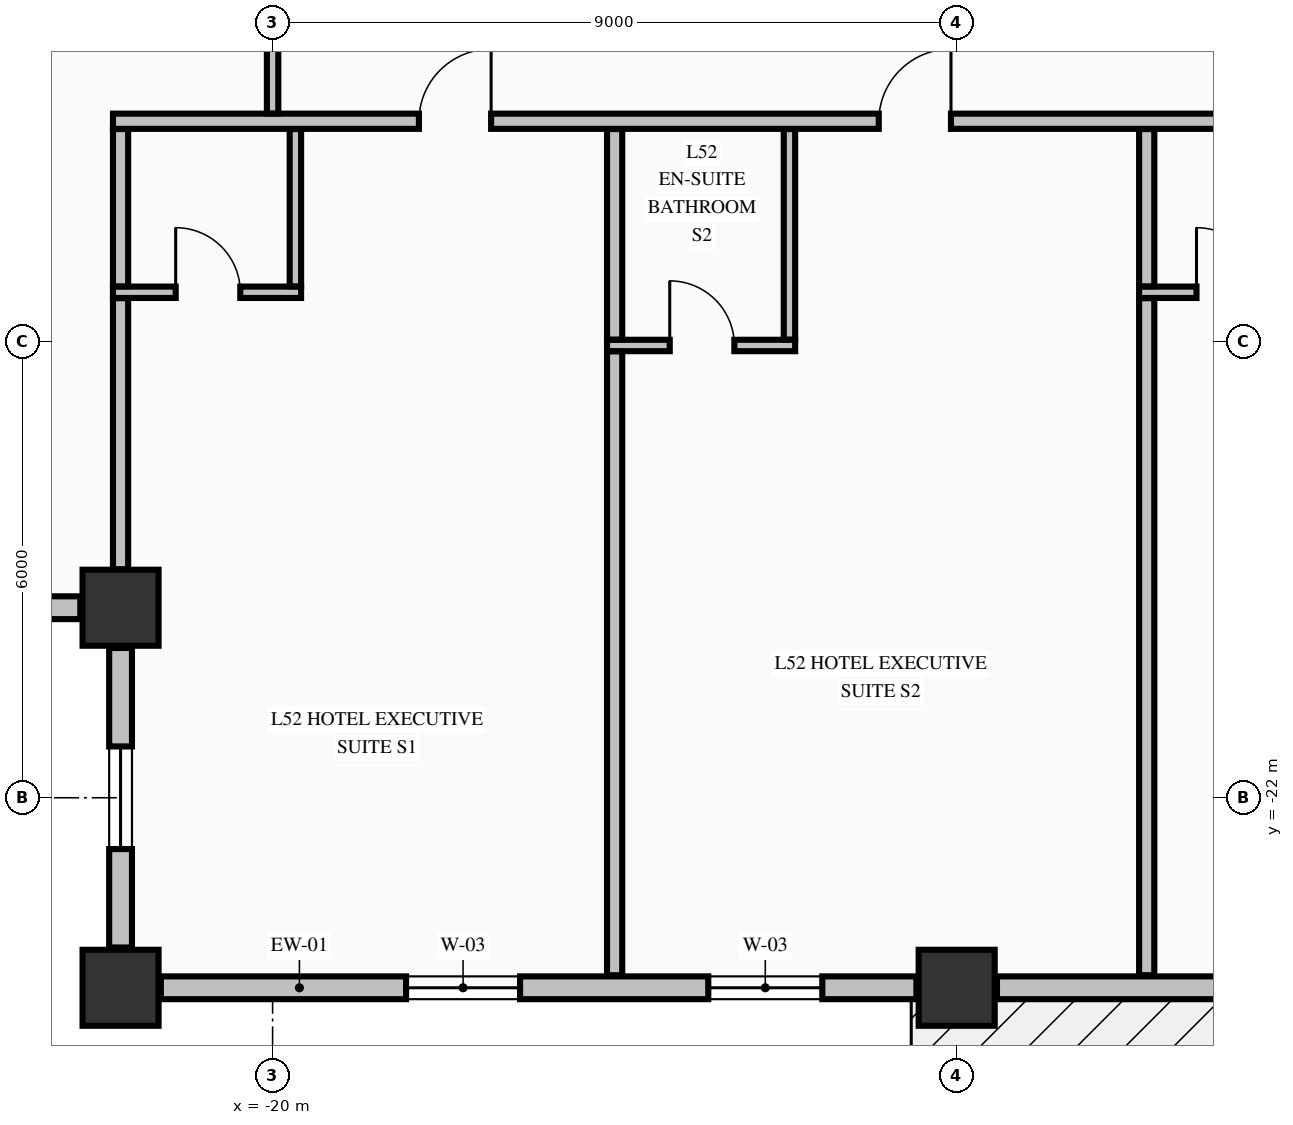
"""IFC4 building model, lengths in metres.
Left out: names, types, materials, properties, quantities, classifications, styles, units other than length and angle.
Written with IfcOpenShell. Run it as: python <this file> out.ifc"""

import sys

from ifc_helpers import new_model, si_unit, direction, frame, frame_2d, origin, origin_2d, place, context, subcontext, project, spatial, rectangle, extrude, element, fill, save


model = new_model("IFC4")
c1 = context("Model", 3, precision=1e-05, world=origin(), true_north=direction((0.0, 1.0)))
c2 = subcontext(c1, "Body", "Model", "MODEL_VIEW")
j1 = project(units=[si_unit("LENGTHUNIT", "METRE"), si_unit("PLANEANGLEUNIT", "RADIAN")], contexts=[c1])
p1 = place(None, origin())
s1 = spatial("IfcSite", under=j1, at=p1, CompositionType="ELEMENT")
p2 = place(p1, origin())
s2 = spatial("IfcBuilding", under=s1, at=p2, CompositionType="ELEMENT")
p3 = place(p2, frame((0.0, 0.0, 201.66)))
s3 = spatial("IfcBuildingStorey", under=s2, at=p3, CompositionType="ELEMENT", Elevation=201.66)
for number, where, z_axis, x_axis in (
    (1, (-22.0, -24.5, -0.25), (0.0, 0.0, 1.0), (1.0, 0.0, 0.0)),
    (2, (-11.0, -24.5, -0.25), (0.0, 0.0, 1.0), (1.0, 0.0, 0.0)),
    (3, (-22.0, -19.5, -0.25), (0.0, 0.0, 1.0), (1.0, 0.0, 0.0)),
):
    element("IfcColumn", number, at=place(p3, frame(where, z_axis=z_axis, x_axis=x_axis)), inside=s3, PredefinedType="COLUMN", context=c2, shape_type="SweptSolid", body=[
        extrude(rectangle(XDim=1.0, YDim=1.0, at=origin_2d()), origin(), (0.0, 0.0, 1.0), 3.4),
    ])
p4 = place(p3, frame((-26.47, -19.5, 0.0), z_axis=(0.0, 0.0, 1.0), x_axis=(1.0, 0.0, 0.0)))
e4 = element("IfcWall", 4, at=p4, inside=s3, PredefinedType="STANDARD", context=c2, shape_type="SweptSolid", body=[
    extrude(rectangle(XDim=3.94, YDim=0.3, at=frame_2d((1.97, 0.0))), origin(), (0.0, 0.0, 1.0), 2.542),
])
p5 = place(p4, frame((1.295, 0.0, 0.68)))
e5 = element("IfcOpeningElement", 5, at=p5, cuts=e4, PredefinedType="OPENING", context=c2, shape_type="SweptSolid", body=[
    extrude(rectangle(XDim=1.35, YDim=1.42, at=frame_2d((0.675, 0.71))), frame((0.0, 0.16, 0.0), z_axis=(0.0, -1.0, 0.0), x_axis=(1.0, 0.0, 0.0)), (0.0, 0.0, 1.0), 0.32),
])
p6 = place(p3, frame((-22.0, -20.03, 0.0), z_axis=(0.0, 0.0, 1.0), x_axis=(0.0, -1.0, 0.0)))
e6 = element("IfcWall", 6, at=p6, inside=s3, PredefinedType="STANDARD", context=c2, shape_type="SweptSolid", body=[
    extrude(rectangle(XDim=3.94, YDim=0.3, at=frame_2d((1.97, 0.0))), origin(), (0.0, 0.0, 1.0), 2.542),
])
p7 = place(p6, frame((1.295, 0.0, 0.68)))
e7 = element("IfcOpeningElement", 7, at=p7, cuts=e6, PredefinedType="OPENING", context=c2, shape_type="SweptSolid", body=[
    extrude(rectangle(XDim=1.35, YDim=1.42, at=frame_2d((0.675, 0.71))), frame((0.0, 0.16, 0.0), z_axis=(0.0, -1.0, 0.0), x_axis=(1.0, 0.0, 0.0)), (0.0, 0.0, 1.0), 0.32),
])
p8 = place(p3, frame((-21.47, -24.5, 0.0), z_axis=(0.0, 0.0, 1.0), x_axis=(1.0, 0.0, 0.0)))
e8 = element("IfcWall", 8, at=p8, inside=s3, PredefinedType="STANDARD", context=c2, shape_type="SweptSolid", body=[
    extrude(rectangle(XDim=9.94, YDim=0.3, at=frame_2d((4.97, 0.0))), origin(), (0.0, 0.0, 1.0), 2.542),
])
p9 = place(p8, frame((3.226, 0.0, 0.72)))
e9 = element("IfcOpeningElement", 9, at=p9, cuts=e8, PredefinedType="OPENING", context=c2, shape_type="SweptSolid", body=[
    extrude(rectangle(XDim=1.5, YDim=1.6, at=frame_2d((0.75, 0.8))), frame((0.0, 0.16, 0.0), z_axis=(0.0, -1.0, 0.0), x_axis=(1.0, 0.0, 0.0)), (0.0, 0.0, 1.0), 0.32),
])
p10 = place(p8, frame((7.202, 0.0, 0.72)))
e10 = element("IfcOpeningElement", 10, at=p10, cuts=e8, PredefinedType="OPENING", context=c2, shape_type="SweptSolid", body=[
    extrude(rectangle(XDim=1.5, YDim=1.6, at=frame_2d((0.75, 0.8))), frame((0.0, 0.16, 0.0), z_axis=(0.0, -1.0, 0.0), x_axis=(1.0, 0.0, 0.0)), (0.0, 0.0, 1.0), 0.32),
])
p11 = place(p3, frame((-10.47, -24.5, 0.0), z_axis=(0.0, 0.0, 1.0), x_axis=(1.0, 0.0, 0.0)))
e11 = element("IfcWall", 11, at=p11, inside=s3, PredefinedType="STANDARD", context=c2, shape_type="SweptSolid", body=[
    extrude(rectangle(XDim=9.94, YDim=0.3, at=frame_2d((4.97, 0.0))), origin(), (0.0, 0.0, 1.0), 2.542),
])
p12 = place(p11, frame((4.068, 0.0, 0.0)))
e12 = element("IfcOpeningElement", 12, at=p12, cuts=e11, PredefinedType="OPENING", context=c2, shape_type="SweptSolid", body=[
    extrude(rectangle(XDim=1.1, YDim=2.15, at=frame_2d((0.55, 1.075))), frame((0.0, 0.16, 0.0), z_axis=(0.0, -1.0, 0.0), x_axis=(1.0, 0.0, 0.0)), (0.0, 0.0, 1.0), 0.32),
])
p13 = place(p3, frame((-15.6, -16.05, 0.0), z_axis=(0.0, 0.0, 1.0), x_axis=(1.0, 0.0, 0.0)))
e13 = element("IfcWall", 13, at=p13, inside=s3, PredefinedType="PARTITIONING", context=c2, shape_type="SweptSolid", body=[
    extrude(rectangle(XDim=2.475, YDim=0.15, at=frame_2d((1.238, 0.0))), origin(), (0.0, 0.0, 1.0), 3.15),
])
p14 = place(p13, frame((0.825, 0.0, 0.0)))
e14 = element("IfcOpeningElement", 14, at=p14, cuts=e13, PredefinedType="OPENING", context=c2, shape_type="SweptSolid", body=[
    extrude(rectangle(XDim=0.85, YDim=2.1, at=frame_2d((0.425, 1.05))), frame((0.0, 0.085, 0.0), z_axis=(0.0, -1.0, 0.0), x_axis=(1.0, 0.0, 0.0)), (0.0, 0.0, 1.0), 0.17),
])
p15 = place(p3, frame((-22.1, -15.35, 0.0), z_axis=(0.0, 0.0, 1.0), x_axis=(1.0, 0.0, 0.0)))
e15 = element("IfcWall", 15, at=p15, inside=s3, PredefinedType="PARTITIONING", context=c2, shape_type="SweptSolid", body=[
    extrude(rectangle(XDim=2.475, YDim=0.15, at=frame_2d((1.238, 0.0))), origin(), (0.0, 0.0, 1.0), 3.15),
])
p16 = place(p15, frame((0.825, 0.0, 0.0)))
e16 = element("IfcOpeningElement", 16, at=p16, cuts=e15, PredefinedType="OPENING", context=c2, shape_type="SweptSolid", body=[
    extrude(rectangle(XDim=0.85, YDim=2.1, at=frame_2d((0.425, 1.05))), frame((0.0, 0.085, 0.0), z_axis=(0.0, -1.0, 0.0), x_axis=(1.0, 0.0, 0.0)), (0.0, 0.0, 1.0), 0.17),
])
p17 = place(p3, frame((-8.6, -15.35, 0.0), z_axis=(0.0, 0.0, 1.0), x_axis=(1.0, 0.0, 0.0)))
e17 = element("IfcWall", 17, at=p17, inside=s3, PredefinedType="PARTITIONING", context=c2, shape_type="SweptSolid", body=[
    extrude(rectangle(XDim=2.335, YDim=0.15, at=frame_2d((1.167, 0.0))), origin(), (0.0, 0.0, 1.0), 3.15),
])
p18 = place(p17, frame((0.755, 0.0, 0.0)))
e18 = element("IfcOpeningElement", 18, at=p18, cuts=e17, PredefinedType="OPENING", context=c2, shape_type="SweptSolid", body=[
    extrude(rectangle(XDim=0.85, YDim=2.1, at=frame_2d((0.425, 1.05))), frame((0.0, 0.085, 0.0), z_axis=(0.0, -1.0, 0.0), x_axis=(1.0, 0.0, 0.0)), (0.0, 0.0, 1.0), 0.17),
])
p19 = place(p3, frame((-22.1, -13.1, 0.0), z_axis=(0.0, 0.0, 1.0), x_axis=(1.0, 0.0, 0.0)))
e19 = element("IfcWall", 19, at=p19, inside=s3, PredefinedType="PARTITIONING", context=c2, shape_type="SweptSolid", body=[
    extrude(rectangle(XDim=39.2, YDim=0.2, at=frame_2d((19.6, 0.0))), origin(), (0.0, 0.0, 1.0), 3.15),
])
p20 = place(p19, frame((4.025, 0.0, 0.0)))
e20 = element("IfcOpeningElement", 20, at=p20, cuts=e19, PredefinedType="OPENING", context=c2, shape_type="SweptSolid", body=[
    extrude(rectangle(XDim=0.95, YDim=2.15, at=frame_2d((0.475, 1.075))), frame((0.0, 0.11, 0.0), z_axis=(0.0, -1.0, 0.0), x_axis=(1.0, 0.0, 0.0)), (0.0, 0.0, 1.0), 0.22),
])
p21 = place(p19, frame((10.075, 0.0, 0.0)))
e21 = element("IfcOpeningElement", 21, at=p21, cuts=e19, PredefinedType="OPENING", context=c2, shape_type="SweptSolid", body=[
    extrude(rectangle(XDim=0.95, YDim=2.15, at=frame_2d((0.475, 1.075))), frame((0.0, 0.11, 0.0), z_axis=(0.0, -1.0, 0.0), x_axis=(1.0, 0.0, 0.0)), (0.0, 0.0, 1.0), 0.22),
])
p22 = place(p19, frame((16.905, 0.0, 0.0)))
e22 = element("IfcOpeningElement", 22, at=p22, cuts=e19, PredefinedType="OPENING", context=c2, shape_type="SweptSolid", body=[
    extrude(rectangle(XDim=0.95, YDim=2.15, at=frame_2d((0.475, 1.075))), frame((0.0, 0.11, 0.0), z_axis=(0.0, -1.0, 0.0), x_axis=(1.0, 0.0, 0.0)), (0.0, 0.0, 1.0), 0.22),
])
p23 = place(p19, frame((22.475, 0.0, 0.0)))
e23 = element("IfcOpeningElement", 23, at=p23, cuts=e19, PredefinedType="OPENING", context=c2, shape_type="SweptSolid", body=[
    extrude(rectangle(XDim=0.95, YDim=2.15, at=frame_2d((0.475, 1.075))), frame((0.0, 0.11, 0.0), z_axis=(0.0, -1.0, 0.0), x_axis=(1.0, 0.0, 0.0)), (0.0, 0.0, 1.0), 0.22),
])
p24 = place(p19, frame((30.675, 0.0, 0.0)))
e24 = element("IfcOpeningElement", 24, at=p24, cuts=e19, PredefinedType="OPENING", context=c2, shape_type="SweptSolid", body=[
    extrude(rectangle(XDim=0.95, YDim=2.15, at=frame_2d((0.475, 1.075))), frame((0.0, 0.11, 0.0), z_axis=(0.0, -1.0, 0.0), x_axis=(1.0, 0.0, 0.0)), (0.0, 0.0, 1.0), 0.22),
])
p25 = place(p19, frame((36.325, 0.0, 0.0)))
e25 = element("IfcOpeningElement", 25, at=p25, cuts=e19, PredefinedType="OPENING", context=c2, shape_type="SweptSolid", body=[
    extrude(rectangle(XDim=1.05, YDim=2.15, at=frame_2d((0.525, 1.075))), frame((0.0, 0.11, 0.0), z_axis=(0.0, -1.0, 0.0), x_axis=(1.0, 0.0, 0.0)), (0.0, 0.0, 1.0), 0.22),
])
p26 = place(p3, frame((-22.0, -18.994, 0.0), z_axis=(0.0, 0.0, 1.0), x_axis=(0.0, 1.0, 0.0)))
e26 = element("IfcWall", 26, at=p26, inside=s3, PredefinedType="PARTITIONING", context=c2, shape_type="SweptSolid", body=[
    extrude(rectangle(XDim=3.566, YDim=0.2, at=frame_2d((1.783, 0.0))), origin(), (0.0, 0.0, 1.0), 3.15),
])
p27 = place(p3, frame((-22.0, -15.272, 0.0), z_axis=(0.0, 0.0, 1.0), x_axis=(0.0, 1.0, 0.0)))
e27 = element("IfcWall", 27, at=p27, inside=s3, PredefinedType="PARTITIONING", context=c2, shape_type="SweptSolid", body=[
    extrude(rectangle(XDim=2.069, YDim=0.2, at=frame_2d((1.035, 0.0))), origin(), (0.0, 0.0, 1.0), 3.15),
])
p28 = place(p3, frame((-20.0, -12.997, 0.0), z_axis=(0.0, 0.0, 1.0), x_axis=(0.0, 1.0, 0.0)))
e28 = element("IfcWall", 28, at=p28, inside=s3, PredefinedType="PARTITIONING", context=c2, shape_type="SweptSolid", body=[
    extrude(rectangle(XDim=2.616, YDim=0.15, at=frame_2d((1.308, 0.0))), origin(), (0.0, 0.0, 1.0), 2.342),
])
p29 = place(p3, frame((-19.7, -15.272, 0.0), z_axis=(0.0, 0.0, 1.0), x_axis=(0.0, 1.0, 0.0)))
e29 = element("IfcWall", 29, at=p29, inside=s3, PredefinedType="PARTITIONING", context=c2, shape_type="SweptSolid", body=[
    extrude(rectangle(XDim=2.069, YDim=0.15, at=frame_2d((1.035, 0.0))), origin(), (0.0, 0.0, 1.0), 2.342),
])
p30 = place(p3, frame((-15.5, -24.335, 0.0), z_axis=(0.0, 0.0, 1.0), x_axis=(0.0, 1.0, 0.0)))
e30 = element("IfcWall", 30, at=p30, inside=s3, PredefinedType="PARTITIONING", context=c2, shape_type="SweptSolid", body=[
    extrude(rectangle(XDim=8.207, YDim=0.2, at=frame_2d((4.104, 0.0))), origin(), (0.0, 0.0, 1.0), 3.15),
])
p31 = place(p3, frame((-15.5, -15.972, 0.0), z_axis=(0.0, 0.0, 1.0), x_axis=(0.0, 1.0, 0.0)))
e31 = element("IfcWall", 31, at=p31, inside=s3, PredefinedType="PARTITIONING", context=c2, shape_type="SweptSolid", body=[
    extrude(rectangle(XDim=2.769, YDim=0.2, at=frame_2d((1.385, 0.0))), origin(), (0.0, 0.0, 1.0), 3.15),
])
p32 = place(p3, frame((-13.2, -15.972, 0.0), z_axis=(0.0, 0.0, 1.0), x_axis=(0.0, 1.0, 0.0)))
e32 = element("IfcWall", 32, at=p32, inside=s3, PredefinedType="PARTITIONING", context=c2, shape_type="SweptSolid", body=[
    extrude(rectangle(XDim=2.769, YDim=0.15, at=frame_2d((1.385, 0.0))), origin(), (0.0, 0.0, 1.0), 3.15),
])
p33 = place(p3, frame((-8.5, -24.335, 0.0), z_axis=(0.0, 0.0, 1.0), x_axis=(0.0, 1.0, 0.0)))
e33 = element("IfcWall", 33, at=p33, inside=s3, PredefinedType="PARTITIONING", context=c2, shape_type="SweptSolid", body=[
    extrude(rectangle(XDim=8.907, YDim=0.2, at=frame_2d((4.454, 0.0))), origin(), (0.0, 0.0, 1.0), 3.15),
])
p34 = place(p3, frame((-8.5, -15.272, 0.0), z_axis=(0.0, 0.0, 1.0), x_axis=(0.0, 1.0, 0.0)))
e34 = element("IfcWall", 34, at=p34, inside=s3, PredefinedType="PARTITIONING", context=c2, shape_type="SweptSolid", body=[
    extrude(rectangle(XDim=2.069, YDim=0.2, at=frame_2d((1.035, 0.0))), origin(), (0.0, 0.0, 1.0), 3.15),
])
p35 = place(p7, origin())
e35 = element("IfcWindow", 35, at=p35, inside=s3, PartitioningType="SINGLE_PANEL", PredefinedType="WINDOW", context=c2, shape_type="SweptSolid", body=[
    extrude(rectangle(XDim=1.35, YDim=1.42, at=frame_2d((0.675, 0.71))), frame((0.0, 0.03, 0.0), z_axis=(0.0, -1.0, 0.0), x_axis=(1.0, 0.0, 0.0)), (0.0, 0.0, 1.0), 0.06),
])
fill(e7, e35)
p36 = place(p9, origin())
e36 = element("IfcWindow", 36, at=p36, inside=s3, PartitioningType="SINGLE_PANEL", PredefinedType="WINDOW", context=c2, shape_type="SweptSolid", body=[
    extrude(rectangle(XDim=1.5, YDim=1.6, at=frame_2d((0.75, 0.8))), frame((0.0, 0.03, 0.0), z_axis=(0.0, -1.0, 0.0), x_axis=(1.0, 0.0, 0.0)), (0.0, 0.0, 1.0), 0.06),
])
fill(e9, e36)
p37 = place(p10, origin())
e37 = element("IfcWindow", 37, at=p37, inside=s3, PartitioningType="SINGLE_PANEL", PredefinedType="WINDOW", context=c2, shape_type="SweptSolid", body=[
    extrude(rectangle(XDim=1.5, YDim=1.6, at=frame_2d((0.75, 0.8))), frame((0.0, 0.03, 0.0), z_axis=(0.0, -1.0, 0.0), x_axis=(1.0, 0.0, 0.0)), (0.0, 0.0, 1.0), 0.06),
])
fill(e10, e37)
p38 = place(p20, origin())
e38 = element("IfcDoor", 38, at=p38, inside=s3, OperationType="SINGLE_SWING_RIGHT", PredefinedType="DOOR", context=c2, shape_type="SweptSolid", body=[
    extrude(rectangle(XDim=0.95, YDim=2.15, at=frame_2d((0.475, 1.075))), frame((0.0, 0.025, 0.0), z_axis=(0.0, -1.0, 0.0), x_axis=(1.0, 0.0, 0.0)), (0.0, 0.0, 1.0), 0.05),
])
fill(e20, e38)
p39 = place(p16, origin())
e39 = element("IfcDoor", 39, at=p39, inside=s3, OperationType="SINGLE_SWING_LEFT", PredefinedType="DOOR", context=c2, shape_type="SweptSolid", body=[
    extrude(rectangle(XDim=0.85, YDim=2.1, at=frame_2d((0.425, 1.05))), frame((0.0, 0.025, 0.0), z_axis=(0.0, -1.0, 0.0), x_axis=(1.0, 0.0, 0.0)), (0.0, 0.0, 1.0), 0.05),
])
fill(e16, e39)
p40 = place(p21, origin())
e40 = element("IfcDoor", 40, at=p40, inside=s3, OperationType="SINGLE_SWING_RIGHT", PredefinedType="DOOR", context=c2, shape_type="SweptSolid", body=[
    extrude(rectangle(XDim=0.95, YDim=2.15, at=frame_2d((0.475, 1.075))), frame((0.0, 0.025, 0.0), z_axis=(0.0, -1.0, 0.0), x_axis=(1.0, 0.0, 0.0)), (0.0, 0.0, 1.0), 0.05),
])
fill(e21, e40)
p41 = place(p14, origin())
e41 = element("IfcDoor", 41, at=p41, inside=s3, OperationType="SINGLE_SWING_LEFT", PredefinedType="DOOR", context=c2, shape_type="SweptSolid", body=[
    extrude(rectangle(XDim=0.85, YDim=2.1, at=frame_2d((0.425, 1.05))), frame((0.0, 0.025, 0.0), z_axis=(0.0, -1.0, 0.0), x_axis=(1.0, 0.0, 0.0)), (0.0, 0.0, 1.0), 0.05),
])
fill(e14, e41)
p42 = place(p18, origin())
e42 = element("IfcDoor", 42, at=p42, inside=s3, OperationType="SINGLE_SWING_LEFT", PredefinedType="DOOR", context=c2, shape_type="SweptSolid", body=[
    extrude(rectangle(XDim=0.85, YDim=2.1, at=frame_2d((0.425, 1.05))), frame((0.0, 0.025, 0.0), z_axis=(0.0, -1.0, 0.0), x_axis=(1.0, 0.0, 0.0)), (0.0, 0.0, 1.0), 0.05),
])
fill(e18, e42)
save(model, sys.argv[1])
